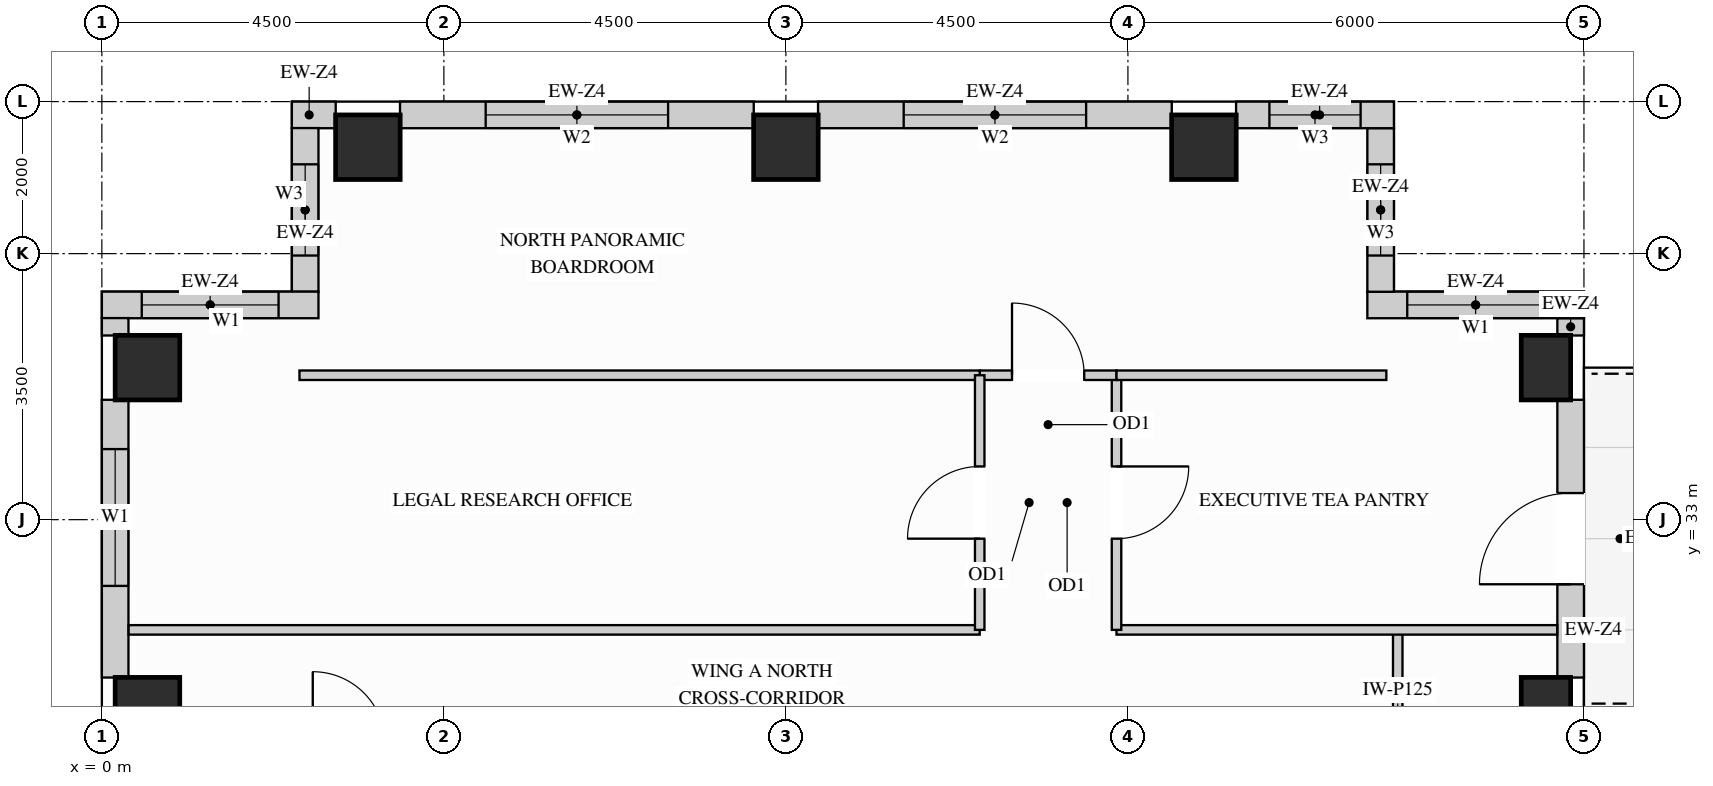
"""IFC4 building model, lengths in metres.
Left out: names, types, materials, properties, quantities, classifications, styles, units other than length and angle.
Written with IfcOpenShell. Run it as: python <this file> out.ifc"""

import sys

from ifc_helpers import new_model, si_unit, direction, frame, frame_2d, origin, origin_2d, place, context, subcontext, project, spatial, rectangle, extrude, source, transform, mapped, element, fill, save


model = new_model("IFC4")
c1 = context("Model", 3, precision=1e-05, world=origin(), true_north=direction((0.0, 1.0)))
c2 = subcontext(c1, "Body", "Model", "MODEL_VIEW")
j1 = project(units=[si_unit("LENGTHUNIT", "METRE"), si_unit("PLANEANGLEUNIT", "RADIAN")], contexts=[c1])
p1 = place(None, origin())
s1 = spatial("IfcSite", under=j1, at=p1, CompositionType="ELEMENT")
p2 = place(p1, origin())
s2 = spatial("IfcBuilding", under=s1, at=p2, CompositionType="ELEMENT")
p3 = place(p2, frame((0.0, 0.0, 223.2)))
s3 = spatial("IfcBuildingStorey", under=s2, at=p3, CompositionType="ELEMENT", Elevation=223.2)
m1 = source(origin(), c2, "Body", "SweptSolid", [
    extrude(rectangle(XDim=0.65, YDim=0.85, at=origin_2d()), origin(), (0.0, 0.0, 1.0), 3.4),
])
for number, where, z_axis, x_axis in (
    (1, (19.0, 30.5, 0.0), (0.0, 0.0, 1.0), (1.0, 0.0, 0.0)),
    (2, (19.0, 35.0, 0.0), (0.0, 0.0, 1.0), (1.0, 0.0, 0.0)),
):
    element("IfcColumn", number, at=place(p3, frame(where, z_axis=z_axis, x_axis=x_axis)), inside=s3, PredefinedType="COLUMN", context=c2, shape_type="MappedRepresentation", body=[
        mapped(m1, transform((0.0, 0.0, 0.0), x_axis=(1.0, 0.0, 0.0), y_axis=(0.0, 1.0, 0.0), z_axis=(0.0, 0.0, 1.0))),
    ])
m2 = source(origin(), c2, "Body", "SweptSolid", [
    extrude(rectangle(XDim=0.85, YDim=0.85, at=origin_2d()), origin(), (0.0, 0.0, 1.0), 3.4),
])
for number, where, z_axis, x_axis in (
    (3, (14.5, 37.9, 0.0), (0.0, 0.0, 1.0), (1.0, 0.0, 0.0)),
    (4, (3.5, 37.9, 0.0), (0.0, 0.0, 1.0), (1.0, 0.0, 0.0)),
    (5, (9.0, 37.9, 0.0), (0.0, 0.0, 1.0), (1.0, 0.0, 0.0)),
    (6, (0.6, 30.5, 0.0), (0.0, 0.0, 1.0), (1.0, 0.0, 0.0)),
    (7, (0.6, 35.0, 0.0), (0.0, 0.0, 1.0), (1.0, 0.0, 0.0)),
):
    element("IfcColumn", number, at=place(p3, frame(where, z_axis=z_axis, x_axis=x_axis)), inside=s3, PredefinedType="COLUMN", context=c2, shape_type="MappedRepresentation", body=[
        mapped(m2, transform((0.0, 0.0, 0.0), x_axis=(1.0, 0.0, 0.0), y_axis=(0.0, 1.0, 0.0), z_axis=(0.0, 0.0, 1.0))),
    ])
p4 = place(p3, frame((19.325, 30.923, 0.0), z_axis=(0.0, 0.0, 1.0), x_axis=(0.0, 1.0, 0.0)))
e8 = element("IfcWall", 8, at=p4, inside=s3, PredefinedType="SOLIDWALL", context=c2, shape_type="SweptSolid", body=[
    extrude(rectangle(XDim=3.654, YDim=0.35, at=frame_2d((1.827, 0.0))), origin(), (0.0, 0.0, 1.0), 2.619),
])
p5 = place(p4, frame((1.227, 0.0, 0.0)))
e9 = element("IfcOpeningElement", 9, at=p5, cuts=e8, PredefinedType="OPENING", context=c2, shape_type="SweptSolid", body=[
    extrude(rectangle(XDim=1.2, YDim=2.15, at=frame_2d((0.6, 1.075))), frame((0.0, 0.185, 0.0), z_axis=(0.0, -1.0, 0.0), x_axis=(1.0, 0.0, 0.0)), (0.0, 0.0, 1.0), 0.37),
])
m3 = source(origin(), c2, "Body", "SweptSolid", [
    extrude(rectangle(XDim=0.229, YDim=0.35, at=frame_2d((0.115, 0.0))), origin(), (0.0, 0.0, 1.0), 3.385),
])
p6 = place(p3, frame((19.325, 35.423, 0.0), z_axis=(0.0, 0.0, 1.0), x_axis=(0.0, 1.0, 0.0)))
e10 = element("IfcWall", 10, at=p6, inside=s3, PredefinedType="SOLIDWALL", context=c2, shape_type="MappedRepresentation", body=[
    mapped(m3, transform((0.0, 0.0, 0.0), x_axis=(1.0, 0.0, 0.0), y_axis=(0.0, 1.0, 0.0), z_axis=(0.0, 0.0, 1.0))),
])
p7 = place(p3, frame((19.5, 35.825, 0.0), z_axis=(0.0, 0.0, 1.0), x_axis=(-1.0, 0.0, 0.0)))
e11 = element("IfcWall", 11, at=p7, inside=s3, PredefinedType="SOLIDWALL", context=c2, shape_type="SweptSolid", body=[
    extrude(rectangle(XDim=2.85, YDim=0.35, at=frame_2d((1.425, 0.0))), origin(), (0.0, 0.0, 1.0), 3.385),
])
p8 = place(p7, frame((0.525, 0.0, 0.78)))
e12 = element("IfcOpeningElement", 12, at=p8, cuts=e11, PredefinedType="OPENING", context=c2, shape_type="SweptSolid", body=[
    extrude(rectangle(XDim=1.8, YDim=2.1, at=frame_2d((0.9, 1.05))), frame((0.0, 0.185, 0.0), z_axis=(0.0, -1.0, 0.0), x_axis=(1.0, 0.0, 0.0)), (0.0, 0.0, 1.0), 0.37),
])
p9 = place(p3, frame((16.825, 35.998, 0.0), z_axis=(0.0, 0.0, 1.0), x_axis=(0.0, 1.0, 0.0)))
e13 = element("IfcWall", 13, at=p9, inside=s3, PredefinedType="SOLIDWALL", context=c2, shape_type="SweptSolid", body=[
    extrude(rectangle(XDim=2.154, YDim=0.35, at=frame_2d((1.077, 0.0))), origin(), (0.0, 0.0, 1.0), 3.385),
])
p10 = place(p9, frame((0.477, 0.0, 0.78)))
e14 = element("IfcOpeningElement", 14, at=p10, cuts=e13, PredefinedType="OPENING", context=c2, shape_type="SweptSolid", body=[
    extrude(rectangle(XDim=1.2, YDim=2.1, at=frame_2d((0.6, 1.05))), frame((0.0, 0.185, 0.0), z_axis=(0.0, -1.0, 0.0), x_axis=(1.0, 0.0, 0.0)), (0.0, 0.0, 1.0), 0.37),
])
p11 = place(p3, frame((17.0, 38.325, 0.0), z_axis=(0.0, 0.0, 1.0), x_axis=(-1.0, 0.0, 0.0)))
e15 = element("IfcWall", 15, at=p11, inside=s3, PredefinedType="SOLIDWALL", context=c2, shape_type="SweptSolid", body=[
    extrude(rectangle(XDim=2.077, YDim=0.35, at=frame_2d((1.039, 0.0))), origin(), (0.0, 0.0, 1.0), 3.385),
])
p12 = place(p11, frame((0.438, 0.0, 0.78)))
e16 = element("IfcOpeningElement", 16, at=p12, cuts=e15, PredefinedType="OPENING", context=c2, shape_type="SweptSolid", body=[
    extrude(rectangle(XDim=1.2, YDim=2.1, at=frame_2d((0.6, 1.05))), frame((0.0, 0.185, 0.0), z_axis=(0.0, -1.0, 0.0), x_axis=(1.0, 0.0, 0.0)), (0.0, 0.0, 1.0), 0.37),
])
p13 = place(p3, frame((14.077, 38.325, 0.0), z_axis=(0.0, 0.0, 1.0), x_axis=(-1.0, 0.0, 0.0)))
e17 = element("IfcWall", 17, at=p13, inside=s3, PredefinedType="SOLIDWALL", context=c2, shape_type="SweptSolid", body=[
    extrude(rectangle(XDim=4.654, YDim=0.35, at=frame_2d((2.327, 0.0))), origin(), (0.0, 0.0, 1.0), 3.385),
])
p14 = place(p13, frame((1.127, 0.0, 0.78)))
e18 = element("IfcOpeningElement", 18, at=p14, cuts=e17, PredefinedType="OPENING", context=c2, shape_type="SweptSolid", body=[
    extrude(rectangle(XDim=2.4, YDim=2.1, at=frame_2d((1.2, 1.05))), frame((0.0, 0.185, 0.0), z_axis=(0.0, -1.0, 0.0), x_axis=(1.0, 0.0, 0.0)), (0.0, 0.0, 1.0), 0.37),
])
p15 = place(p3, frame((8.577, 38.325, 0.0), z_axis=(0.0, 0.0, 1.0), x_axis=(-1.0, 0.0, 0.0)))
e19 = element("IfcWall", 19, at=p15, inside=s3, PredefinedType="SOLIDWALL", context=c2, shape_type="SweptSolid", body=[
    extrude(rectangle(XDim=4.654, YDim=0.35, at=frame_2d((2.327, 0.0))), origin(), (0.0, 0.0, 1.0), 3.385),
])
p16 = place(p15, frame((1.127, 0.0, 0.78)))
e20 = element("IfcOpeningElement", 20, at=p16, cuts=e19, PredefinedType="OPENING", context=c2, shape_type="SweptSolid", body=[
    extrude(rectangle(XDim=2.4, YDim=2.1, at=frame_2d((1.2, 1.05))), frame((0.0, 0.185, 0.0), z_axis=(0.0, -1.0, 0.0), x_axis=(1.0, 0.0, 0.0)), (0.0, 0.0, 1.0), 0.37),
])
m4 = source(origin(), c2, "Body", "SweptSolid", [
    extrude(rectangle(XDim=0.577, YDim=0.35, at=frame_2d((0.289, 0.0))), origin(), (0.0, 0.0, 1.0), 3.385),
])
p17 = place(p3, frame((3.077, 38.325, 0.0), z_axis=(0.0, 0.0, 1.0), x_axis=(-1.0, 0.0, 0.0)))
e21 = element("IfcWall", 21, at=p17, inside=s3, PredefinedType="SOLIDWALL", context=c2, shape_type="MappedRepresentation", body=[
    mapped(m4, transform((0.0, 0.0, 0.0), x_axis=(1.0, 0.0, 0.0), y_axis=(0.0, 1.0, 0.0), z_axis=(0.0, 0.0, 1.0))),
])
p18 = place(p3, frame((2.675, 38.152, 0.0), z_axis=(0.0, 0.0, 1.0), x_axis=(0.0, -1.0, 0.0)))
e22 = element("IfcWall", 22, at=p18, inside=s3, PredefinedType="SOLIDWALL", context=c2, shape_type="SweptSolid", body=[
    extrude(rectangle(XDim=2.154, YDim=0.35, at=frame_2d((1.077, 0.0))), origin(), (0.0, 0.0, 1.0), 3.385),
])
p19 = place(p18, frame((0.477, 0.0, 0.78)))
e23 = element("IfcOpeningElement", 23, at=p19, cuts=e22, PredefinedType="OPENING", context=c2, shape_type="SweptSolid", body=[
    extrude(rectangle(XDim=1.2, YDim=2.1, at=frame_2d((0.6, 1.05))), frame((0.0, 0.185, 0.0), z_axis=(0.0, -1.0, 0.0), x_axis=(1.0, 0.0, 0.0)), (0.0, 0.0, 1.0), 0.37),
])
p20 = place(p3, frame((2.85, 35.825, 0.0), z_axis=(0.0, 0.0, 1.0), x_axis=(-1.0, 0.0, 0.0)))
e24 = element("IfcWall", 24, at=p20, inside=s3, PredefinedType="SOLIDWALL", context=c2, shape_type="SweptSolid", body=[
    extrude(rectangle(XDim=2.85, YDim=0.35, at=frame_2d((1.425, 0.0))), origin(), (0.0, 0.0, 1.0), 3.385),
])
p21 = place(p20, frame((0.525, 0.0, 0.78)))
e25 = element("IfcOpeningElement", 25, at=p21, cuts=e24, PredefinedType="OPENING", context=c2, shape_type="SweptSolid", body=[
    extrude(rectangle(XDim=1.8, YDim=2.1, at=frame_2d((0.9, 1.05))), frame((0.0, 0.185, 0.0), z_axis=(0.0, -1.0, 0.0), x_axis=(1.0, 0.0, 0.0)), (0.0, 0.0, 1.0), 0.37),
])
p22 = place(p3, frame((0.175, 35.652, 0.0), z_axis=(0.0, 0.0, 1.0), x_axis=(0.0, -1.0, 0.0)))
e26 = element("IfcWall", 26, at=p22, inside=s3, PredefinedType="SOLIDWALL", context=c2, shape_type="MappedRepresentation", body=[
    mapped(m3, transform((0.0, 0.0, 0.0), x_axis=(1.0, 0.0, 0.0), y_axis=(0.0, 1.0, 0.0), z_axis=(0.0, 0.0, 1.0))),
])
p23 = place(p3, frame((0.175, 34.577, 0.0), z_axis=(0.0, 0.0, 1.0), x_axis=(0.0, -1.0, 0.0)))
e27 = element("IfcWall", 27, at=p23, inside=s3, PredefinedType="SOLIDWALL", context=c2, shape_type="SweptSolid", body=[
    extrude(rectangle(XDim=3.654, YDim=0.35, at=frame_2d((1.827, 0.0))), origin(), (0.0, 0.0, 1.0), 3.385),
])
p24 = place(p23, frame((0.648, 0.0, 0.78)))
e28 = element("IfcOpeningElement", 28, at=p24, cuts=e27, PredefinedType="OPENING", context=c2, shape_type="SweptSolid", body=[
    extrude(rectangle(XDim=1.8, YDim=2.1, at=frame_2d((0.9, 1.05))), frame((0.0, 0.185, 0.0), z_axis=(0.0, -1.0, 0.0), x_axis=(1.0, 0.0, 0.0)), (0.0, 0.0, 1.0), 0.37),
])
p25 = place(p3, frame((17.05, 26.05, 0.0), z_axis=(0.0, 0.0, 1.0), x_axis=(0.0, 1.0, 0.0)))
e29 = element("IfcWall", 29, at=p25, inside=s3, PredefinedType="PARTITIONING", context=c2, shape_type="SweptSolid", body=[
    extrude(rectangle(XDim=5.5, YDim=0.125, at=frame_2d((2.75, 0.0))), origin(), (0.0, 0.0, 1.0), 3.385),
])
p26 = place(p25, frame((2.275, 0.0, 0.0)))
e30 = element("IfcOpeningElement", 30, at=p26, cuts=e29, PredefinedType="OPENING", context=c2, shape_type="SweptSolid", body=[
    extrude(rectangle(XDim=0.95, YDim=2.15, at=frame_2d((0.475, 1.075))), frame((0.0, 0.073, 0.0), z_axis=(0.0, -1.0, 0.0), x_axis=(1.0, 0.0, 0.0)), (0.0, 0.0, 1.0), 0.145),
])
m5 = source(origin(), c2, "Body", "SweptSolid", [
    extrude(rectangle(XDim=5.798, YDim=0.125, at=frame_2d((2.899, 0.0))), origin(), (0.0, 0.0, 1.0), 3.385),
])
p27 = place(p3, frame((13.35, 31.55, 0.0), z_axis=(0.0, 0.0, 1.0), x_axis=(1.0, 0.0, 0.0)))
e31 = element("IfcWall", 31, at=p27, inside=s3, PredefinedType="PARTITIONING", context=c2, shape_type="MappedRepresentation", body=[
    mapped(m5, transform((0.0, 0.0, 0.0), x_axis=(1.0, 0.0, 0.0), y_axis=(0.0, 1.0, 0.0), z_axis=(0.0, 0.0, 1.0))),
])
m6 = source(origin(), c2, "Body", "SweptSolid", [
    extrude(rectangle(XDim=11.198, YDim=0.125, at=frame_2d((5.599, 0.0))), origin(), (0.0, 0.0, 1.0), 3.385),
])
p28 = place(p3, frame((0.352, 31.55, 0.0), z_axis=(0.0, 0.0, 1.0), x_axis=(1.0, 0.0, 0.0)))
e32 = element("IfcWall", 32, at=p28, inside=s3, PredefinedType="PARTITIONING", context=c2, shape_type="MappedRepresentation", body=[
    mapped(m6, transform((0.0, 0.0, 0.0), x_axis=(1.0, 0.0, 0.0), y_axis=(0.0, 1.0, 0.0), z_axis=(0.0, 0.0, 1.0))),
])
p29 = place(p3, frame((13.35, 31.55, 0.0), z_axis=(0.0, 0.0, 1.0), x_axis=(0.0, 1.0, 0.0)))
e33 = element("IfcWall", 33, at=p29, inside=s3, PredefinedType="PARTITIONING", context=c2, shape_type="SweptSolid", body=[
    extrude(rectangle(XDim=3.35, YDim=0.125, at=frame_2d((1.675, 0.0))), origin(), (0.0, 0.0, 1.0), 3.385),
])
p30 = place(p29, frame((1.2, 0.0, 0.0)))
e34 = element("IfcOpeningElement", 34, at=p30, cuts=e33, PredefinedType="OPENING", context=c2, shape_type="SweptSolid", body=[
    extrude(rectangle(XDim=0.95, YDim=2.15, at=frame_2d((0.475, 1.075))), frame((0.0, 0.073, 0.0), z_axis=(0.0, -1.0, 0.0), x_axis=(1.0, 0.0, 0.0)), (0.0, 0.0, 1.0), 0.145),
])
p31 = place(p3, frame((11.55, 34.9, 0.0), z_axis=(0.0, 0.0, 1.0), x_axis=(1.0, 0.0, 0.0)))
e35 = element("IfcWall", 35, at=p31, inside=s3, PredefinedType="PARTITIONING", context=c2, shape_type="SweptSolid", body=[
    extrude(rectangle(XDim=1.8, YDim=0.125, at=frame_2d((0.9, 0.0))), origin(), (0.0, 0.0, 1.0), 3.385),
])
p32 = place(p31, frame((0.425, 0.0, 0.0)))
e36 = element("IfcOpeningElement", 36, at=p32, cuts=e35, PredefinedType="OPENING", context=c2, shape_type="SweptSolid", body=[
    extrude(rectangle(XDim=0.95, YDim=2.15, at=frame_2d((0.475, 1.075))), frame((0.0, 0.073, 0.0), z_axis=(0.0, -1.0, 0.0), x_axis=(1.0, 0.0, 0.0)), (0.0, 0.0, 1.0), 0.145),
])
m7 = source(origin(), c2, "Body", "SweptSolid", [
    extrude(rectangle(XDim=3.55, YDim=0.125, at=frame_2d((1.775, 0.0))), origin(), (0.0, 0.0, 1.0), 3.385),
])
p33 = place(p3, frame((13.35, 34.9, 0.0), z_axis=(0.0, 0.0, 1.0), x_axis=(1.0, 0.0, 0.0)))
e37 = element("IfcWall", 37, at=p33, inside=s3, PredefinedType="PARTITIONING", context=c2, shape_type="MappedRepresentation", body=[
    mapped(m7, transform((0.0, 0.0, 0.0), x_axis=(1.0, 0.0, 0.0), y_axis=(0.0, 1.0, 0.0), z_axis=(0.0, 0.0, 1.0))),
])
m8 = source(origin(), c2, "Body", "SweptSolid", [
    extrude(rectangle(XDim=8.95, YDim=0.125, at=frame_2d((4.475, 0.0))), origin(), (0.0, 0.0, 1.0), 3.385),
])
p34 = place(p3, frame((2.6, 34.9, 0.0), z_axis=(0.0, 0.0, 1.0), x_axis=(1.0, 0.0, 0.0)))
e38 = element("IfcWall", 38, at=p34, inside=s3, PredefinedType="PARTITIONING", context=c2, shape_type="MappedRepresentation", body=[
    mapped(m8, transform((0.0, 0.0, 0.0), x_axis=(1.0, 0.0, 0.0), y_axis=(0.0, 1.0, 0.0), z_axis=(0.0, 0.0, 1.0))),
])
p35 = place(p3, frame((11.55, 31.55, 0.0), z_axis=(0.0, 0.0, 1.0), x_axis=(0.0, 1.0, 0.0)))
e39 = element("IfcWall", 39, at=p35, inside=s3, PredefinedType="PARTITIONING", context=c2, shape_type="SweptSolid", body=[
    extrude(rectangle(XDim=3.35, YDim=0.125, at=frame_2d((1.675, 0.0))), origin(), (0.0, 0.0, 1.0), 3.385),
])
p36 = place(p35, frame((1.2, 0.0, 0.0)))
e40 = element("IfcOpeningElement", 40, at=p36, cuts=e39, PredefinedType="OPENING", context=c2, shape_type="SweptSolid", body=[
    extrude(rectangle(XDim=0.95, YDim=2.15, at=frame_2d((0.475, 1.075))), frame((0.0, 0.073, 0.0), z_axis=(0.0, -1.0, 0.0), x_axis=(1.0, 0.0, 0.0)), (0.0, 0.0, 1.0), 0.145),
])
m9 = source(origin(), c2, "Body", "SweptSolid", [
    extrude(rectangle(XDim=1.2, YDim=2.15, at=frame_2d((0.6, 1.075))), frame((0.0, 0.025, 0.0), z_axis=(0.0, -1.0, 0.0), x_axis=(1.0, 0.0, 0.0)), (0.0, 0.0, 1.0), 0.05),
])
p37 = place(p5, frame((1.2, 0.0, 0.0), z_axis=(0.0, 0.0, 1.0), x_axis=(-1.0, 0.0, 0.0)))
e41 = element("IfcDoor", 41, at=p37, inside=s3, OperationType="SINGLE_SWING_LEFT", PredefinedType="DOOR", context=c2, shape_type="MappedRepresentation", body=[
    mapped(m9, transform((0.0, 0.0, 0.0), x_axis=(1.0, 0.0, 0.0), y_axis=(0.0, 1.0, 0.0), z_axis=(0.0, 0.0, 1.0))),
])
fill(e9, e41)
m10 = source(origin(), c2, "Body", "SweptSolid", [
    extrude(rectangle(XDim=0.95, YDim=2.15, at=frame_2d((0.475, 1.075))), frame((0.0, 0.025, 0.0), z_axis=(0.0, -1.0, 0.0), x_axis=(1.0, 0.0, 0.0)), (0.0, 0.0, 1.0), 0.05),
])
p38 = place(p30, origin())
e42 = element("IfcDoor", 42, at=p38, inside=s3, OperationType="SINGLE_SWING_RIGHT", PredefinedType="DOOR", context=c2, shape_type="MappedRepresentation", body=[
    mapped(m10, transform((0.0, 0.0, 0.0), x_axis=(1.0, 0.0, 0.0), y_axis=(0.0, 1.0, 0.0), z_axis=(0.0, 0.0, 1.0))),
])
fill(e34, e42)
p39 = place(p32, origin())
e43 = element("IfcDoor", 43, at=p39, inside=s3, OperationType="SINGLE_SWING_LEFT", PredefinedType="DOOR", context=c2, shape_type="MappedRepresentation", body=[
    mapped(m10, transform((0.0, 0.0, 0.0), x_axis=(1.0, 0.0, 0.0), y_axis=(0.0, 1.0, 0.0), z_axis=(0.0, 0.0, 1.0))),
])
fill(e36, e43)
p40 = place(p36, origin())
e44 = element("IfcDoor", 44, at=p40, inside=s3, OperationType="SINGLE_SWING_LEFT", PredefinedType="DOOR", context=c2, shape_type="MappedRepresentation", body=[
    mapped(m10, transform((0.0, 0.0, 0.0), x_axis=(1.0, 0.0, 0.0), y_axis=(0.0, 1.0, 0.0), z_axis=(0.0, 0.0, 1.0))),
])
fill(e40, e44)
m11 = source(origin(), c2, "Body", "SweptSolid", [
    extrude(rectangle(XDim=1.8, YDim=2.1, at=frame_2d((0.9, 1.05))), frame((0.0, 0.03, 0.0), z_axis=(0.0, -1.0, 0.0), x_axis=(1.0, 0.0, 0.0)), (0.0, 0.0, 1.0), 0.06),
])
p41 = place(p8, origin())
e45 = element("IfcWindow", 45, at=p41, inside=s3, PartitioningType="SINGLE_PANEL", PredefinedType="WINDOW", context=c2, shape_type="MappedRepresentation", body=[
    mapped(m11, transform((0.0, 0.0, 0.0), x_axis=(1.0, 0.0, 0.0), y_axis=(0.0, 1.0, 0.0), z_axis=(0.0, 0.0, 1.0))),
])
fill(e12, e45)
p42 = place(p21, origin())
e46 = element("IfcWindow", 46, at=p42, inside=s3, PartitioningType="SINGLE_PANEL", PredefinedType="WINDOW", context=c2, shape_type="MappedRepresentation", body=[
    mapped(m11, transform((0.0, 0.0, 0.0), x_axis=(1.0, 0.0, 0.0), y_axis=(0.0, 1.0, 0.0), z_axis=(0.0, 0.0, 1.0))),
])
fill(e25, e46)
p43 = place(p24, origin())
e47 = element("IfcWindow", 47, at=p43, inside=s3, PartitioningType="SINGLE_PANEL", PredefinedType="WINDOW", context=c2, shape_type="MappedRepresentation", body=[
    mapped(m11, transform((0.0, 0.0, 0.0), x_axis=(1.0, 0.0, 0.0), y_axis=(0.0, 1.0, 0.0), z_axis=(0.0, 0.0, 1.0))),
])
fill(e28, e47)
m12 = source(origin(), c2, "Body", "SweptSolid", [
    extrude(rectangle(XDim=2.4, YDim=2.1, at=frame_2d((1.2, 1.05))), frame((0.0, 0.03, 0.0), z_axis=(0.0, -1.0, 0.0), x_axis=(1.0, 0.0, 0.0)), (0.0, 0.0, 1.0), 0.06),
])
p44 = place(p14, origin())
e48 = element("IfcWindow", 48, at=p44, inside=s3, PartitioningType="SINGLE_PANEL", PredefinedType="WINDOW", context=c2, shape_type="MappedRepresentation", body=[
    mapped(m12, transform((0.0, 0.0, 0.0), x_axis=(1.0, 0.0, 0.0), y_axis=(0.0, 1.0, 0.0), z_axis=(0.0, 0.0, 1.0))),
])
fill(e18, e48)
p45 = place(p16, origin())
e49 = element("IfcWindow", 49, at=p45, inside=s3, PartitioningType="SINGLE_PANEL", PredefinedType="WINDOW", context=c2, shape_type="MappedRepresentation", body=[
    mapped(m12, transform((0.0, 0.0, 0.0), x_axis=(1.0, 0.0, 0.0), y_axis=(0.0, 1.0, 0.0), z_axis=(0.0, 0.0, 1.0))),
])
fill(e20, e49)
m13 = source(origin(), c2, "Body", "SweptSolid", [
    extrude(rectangle(XDim=1.2, YDim=2.1, at=frame_2d((0.6, 1.05))), frame((0.0, 0.03, 0.0), z_axis=(0.0, -1.0, 0.0), x_axis=(1.0, 0.0, 0.0)), (0.0, 0.0, 1.0), 0.06),
])
p46 = place(p10, origin())
e50 = element("IfcWindow", 50, at=p46, inside=s3, PartitioningType="SINGLE_PANEL", PredefinedType="WINDOW", context=c2, shape_type="MappedRepresentation", body=[
    mapped(m13, transform((0.0, 0.0, 0.0), x_axis=(1.0, 0.0, 0.0), y_axis=(0.0, 1.0, 0.0), z_axis=(0.0, 0.0, 1.0))),
])
fill(e14, e50)
p47 = place(p12, origin())
e51 = element("IfcWindow", 51, at=p47, inside=s3, PartitioningType="SINGLE_PANEL", PredefinedType="WINDOW", context=c2, shape_type="MappedRepresentation", body=[
    mapped(m13, transform((0.0, 0.0, 0.0), x_axis=(1.0, 0.0, 0.0), y_axis=(0.0, 1.0, 0.0), z_axis=(0.0, 0.0, 1.0))),
])
fill(e16, e51)
p48 = place(p19, origin())
e52 = element("IfcWindow", 52, at=p48, inside=s3, PartitioningType="SINGLE_PANEL", PredefinedType="WINDOW", context=c2, shape_type="MappedRepresentation", body=[
    mapped(m13, transform((0.0, 0.0, 0.0), x_axis=(1.0, 0.0, 0.0), y_axis=(0.0, 1.0, 0.0), z_axis=(0.0, 0.0, 1.0))),
])
fill(e23, e52)
save(model, sys.argv[1])
